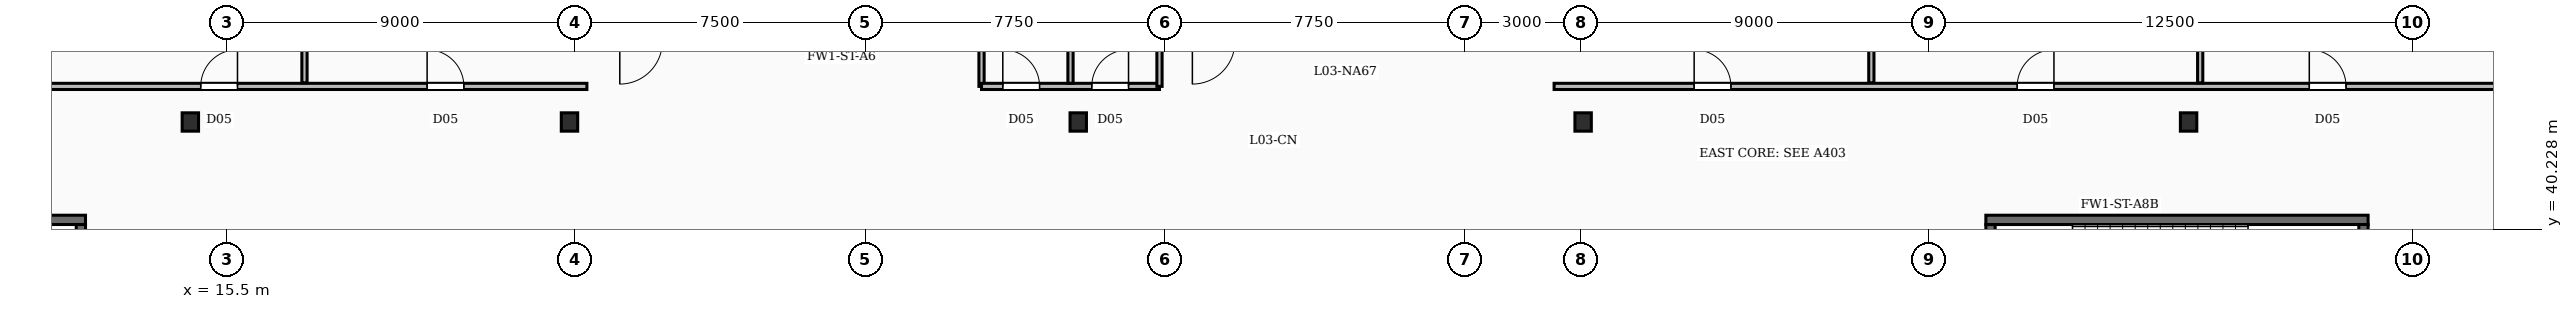
"""IFC4 building model, lengths in metres.
Left out: names, types, materials, properties, quantities, classifications, styles, units other than length and angle.
Written with IfcOpenShell. Run it as: python <this file> out.ifc"""

import sys

from ifc_helpers import new_model, si_unit, direction, frame, frame_2d, origin, origin_2d, place, context, subcontext, project, spatial, rectangle, i_section, extrude, element, fill, save


model = new_model("IFC4")
c1 = context("Model", 3, precision=1e-05, world=origin(), true_north=direction((0.0, 1.0)))
c2 = subcontext(c1, "Body", "Model", "MODEL_VIEW")
j1 = project(units=[si_unit("LENGTHUNIT", "METRE"), si_unit("PLANEANGLEUNIT", "RADIAN")], contexts=[c1])
p1 = place(None, origin())
s1 = spatial("IfcSite", under=j1, at=p1, CompositionType="ELEMENT")
p2 = place(p1, origin())
s2 = spatial("IfcBuilding", under=s1, at=p2, CompositionType="ELEMENT")
p3 = place(p2, frame((0.0, 0.0, 18.0)))
s3 = spatial("IfcBuildingStorey", under=s2, at=p3, CompositionType="ELEMENT", Elevation=18.0)
for number, where, z_axis, x_axis in (
    (1, (14.55, 43.0, -0.35), (0.0, 0.0, 1.0), (1.0, 0.0, 0.0)),
    (2, (24.35, 43.0, -0.35), (0.0, 0.0, 1.0), (1.0, 0.0, 0.0)),
    (3, (37.5, 43.0, -0.35), (0.0, 0.0, 1.0), (1.0, 0.0, 0.0)),
    (4, (50.55, 43.0, -0.35), (0.0, 0.0, 1.0), (1.0, 0.0, 0.0)),
    (5, (66.2, 43.0, -0.35), (0.0, 0.0, 1.0), (1.0, 0.0, 0.0)),
):
    element("IfcColumn", number, at=place(p3, frame(where, z_axis=z_axis, x_axis=x_axis)), inside=s3, PredefinedType="COLUMN", context=c2, shape_type="SweptSolid", body=[
        extrude(i_section(OverallWidth=0.424, OverallDepth=0.474, WebThickness=0.048, FlangeThickness=0.077, FilletRadius=0.02, at=origin_2d()), origin(), (0.0, 0.0, 1.0), 5.0),
    ])
p4 = place(p3, frame((1.96, 40.47, 0.0), z_axis=(0.0, 0.0, 1.0), x_axis=(1.0, 0.0, 0.0)))
e6 = element("IfcWall", 6, at=p4, inside=s3, PredefinedType="SOLIDWALL", context=c2, shape_type="SweptSolid", body=[
    extrude(rectangle(XDim=9.88, YDim=0.24, at=frame_2d((4.94, 0.0))), origin(), (0.0, 0.0, 1.0), 4.65),
])
p5 = place(p3, frame((11.72, 36.2, 0.0), z_axis=(0.0, 0.0, 1.0), x_axis=(0.0, 1.0, 0.0)))
e7 = element("IfcWall", 7, at=p5, inside=s3, PredefinedType="SOLIDWALL", context=c2, shape_type="SweptSolid", body=[
    extrude(rectangle(XDim=4.15, YDim=0.24, at=frame_2d((2.075, 0.0))), origin(), (0.0, 0.0, 1.0), 4.65),
])
p6 = place(p3, frame((60.96, 40.47, 0.0), z_axis=(0.0, 0.0, 1.0), x_axis=(1.0, 0.0, 0.0)))
e8 = element("IfcWall", 8, at=p6, inside=s3, PredefinedType="SOLIDWALL", context=c2, shape_type="SweptSolid", body=[
    extrude(rectangle(XDim=9.88, YDim=0.24, at=frame_2d((4.94, 0.0))), origin(), (0.0, 0.0, 1.0), 4.65),
])
for number, where, z_axis, x_axis in (
    (9, (61.08, 36.2, 0.0), (0.0, 0.0, 1.0), (0.0, 1.0, 0.0)),
    (10, (70.72, 36.2, 0.0), (0.0, 0.0, 1.0), (0.0, 1.0, 0.0)),
):
    element("IfcWall", number, at=place(p3, frame(where, z_axis=z_axis, x_axis=x_axis)), inside=s3, PredefinedType="SOLIDWALL", context=c2, shape_type="SweptSolid", body=[
        extrude(rectangle(XDim=4.15, YDim=0.24, at=frame_2d((2.075, 0.0))), origin(), (0.0, 0.0, 1.0), 4.65),
    ])
p7 = place(p3, frame((17.5, 44.01, 0.0), z_axis=(0.0, 0.0, 1.0), x_axis=(0.0, 1.0, 0.0)))
e11 = element("IfcWall", 11, at=p7, inside=s3, PredefinedType="PARTITIONING", context=c2, shape_type="SweptSolid", body=[
    extrude(rectangle(XDim=10.49, YDim=0.135, at=frame_2d((5.245, 0.0))), origin(), (0.0, 0.0, 1.0), 3.71),
])
p8 = place(p7, frame((2.2, 0.0, 0.0)))
e12 = element("IfcOpeningElement", 12, at=p8, cuts=e11, PredefinedType="OPENING", context=c2, shape_type="SweptSolid", body=[
    extrude(rectangle(XDim=0.95, YDim=2.15, at=frame_2d((0.475, 1.075))), frame((0.0, 0.077, 0.0), z_axis=(0.0, -1.0, 0.0), x_axis=(1.0, 0.0, 0.0)), (0.0, 0.0, 1.0), 0.155),
])
p9 = place(p3, frame((0.0, 43.92, 0.0), z_axis=(0.0, 0.0, 1.0), x_axis=(1.0, 0.0, 0.0)))
e13 = element("IfcWall", 13, at=p9, inside=s3, PredefinedType="PARTITIONING", context=c2, shape_type="SweptSolid", body=[
    extrude(rectangle(XDim=24.8, YDim=0.16, at=frame_2d((12.4, 0.0))), origin(), (0.0, 0.0, 1.0), 3.71),
])
p10 = place(p9, frame((14.818, 0.0, 0.0)))
e14 = element("IfcOpeningElement", 14, at=p10, cuts=e13, PredefinedType="OPENING", context=c2, shape_type="SweptSolid", body=[
    extrude(rectangle(XDim=0.95, YDim=2.15, at=frame_2d((0.475, 1.075))), frame((0.0, 0.09, 0.0), z_axis=(0.0, -1.0, 0.0), x_axis=(1.0, 0.0, 0.0)), (0.0, 0.0, 1.0), 0.18),
])
p11 = place(p9, frame((20.67, 0.0, 0.0)))
e15 = element("IfcOpeningElement", 15, at=p11, cuts=e13, PredefinedType="OPENING", context=c2, shape_type="SweptSolid", body=[
    extrude(rectangle(XDim=0.95, YDim=2.15, at=frame_2d((0.475, 1.075))), frame((0.0, 0.09, 0.0), z_axis=(0.0, -1.0, 0.0), x_axis=(1.0, 0.0, 0.0)), (0.0, 0.0, 1.0), 0.18),
])
p12 = place(p3, frame((58.0, 44.01, 0.0), z_axis=(0.0, 0.0, 1.0), x_axis=(0.0, 1.0, 0.0)))
e16 = element("IfcWall", 16, at=p12, inside=s3, PredefinedType="PARTITIONING", context=c2, shape_type="SweptSolid", body=[
    extrude(rectangle(XDim=10.49, YDim=0.135, at=frame_2d((5.245, 0.0))), origin(), (0.0, 0.0, 1.0), 3.71),
])
p13 = place(p12, frame((2.2, 0.0, 0.0)))
e17 = element("IfcOpeningElement", 17, at=p13, cuts=e16, PredefinedType="OPENING", context=c2, shape_type="SweptSolid", body=[
    extrude(rectangle(XDim=0.95, YDim=2.15, at=frame_2d((0.475, 1.075))), frame((0.0, 0.077, 0.0), z_axis=(0.0, -1.0, 0.0), x_axis=(1.0, 0.0, 0.0)), (0.0, 0.0, 1.0), 0.155),
])
p14 = place(p3, frame((66.5, 44.01, 0.0), z_axis=(0.0, 0.0, 1.0), x_axis=(0.0, 1.0, 0.0)))
e18 = element("IfcWall", 18, at=p14, inside=s3, PredefinedType="PARTITIONING", context=c2, shape_type="SweptSolid", body=[
    extrude(rectangle(XDim=10.49, YDim=0.135, at=frame_2d((5.245, 0.0))), origin(), (0.0, 0.0, 1.0), 3.71),
])
p15 = place(p14, frame((2.2, 0.0, 0.0)))
e19 = element("IfcOpeningElement", 19, at=p15, cuts=e18, PredefinedType="OPENING", context=c2, shape_type="SweptSolid", body=[
    extrude(rectangle(XDim=0.95, YDim=2.15, at=frame_2d((0.475, 1.075))), frame((0.0, 0.077, 0.0), z_axis=(0.0, -1.0, 0.0), x_axis=(1.0, 0.0, 0.0)), (0.0, 0.0, 1.0), 0.155),
])
p16 = place(p3, frame((49.8, 43.92, 0.0), z_axis=(0.0, 0.0, 1.0), x_axis=(1.0, 0.0, 0.0)))
e20 = element("IfcWall", 20, at=p16, inside=s3, PredefinedType="PARTITIONING", context=c2, shape_type="SweptSolid", body=[
    extrude(rectangle(XDim=29.7, YDim=0.16, at=frame_2d((14.85, 0.0))), origin(), (0.0, 0.0, 1.0), 3.71),
])
p17 = place(p16, frame((3.62, 0.0, 0.0)))
e21 = element("IfcOpeningElement", 21, at=p17, cuts=e20, PredefinedType="OPENING", context=c2, shape_type="SweptSolid", body=[
    extrude(rectangle(XDim=0.95, YDim=2.15, at=frame_2d((0.475, 1.075))), frame((0.0, 0.09, 0.0), z_axis=(0.0, -1.0, 0.0), x_axis=(1.0, 0.0, 0.0)), (0.0, 0.0, 1.0), 0.18),
])
p18 = place(p16, frame((11.97, 0.0, 0.0)))
e22 = element("IfcOpeningElement", 22, at=p18, cuts=e20, PredefinedType="OPENING", context=c2, shape_type="SweptSolid", body=[
    extrude(rectangle(XDim=0.95, YDim=2.15, at=frame_2d((0.475, 1.075))), frame((0.0, 0.09, 0.0), z_axis=(0.0, -1.0, 0.0), x_axis=(1.0, 0.0, 0.0)), (0.0, 0.0, 1.0), 0.18),
])
p19 = place(p16, frame((19.52, 0.0, 0.0)))
e23 = element("IfcOpeningElement", 23, at=p19, cuts=e20, PredefinedType="OPENING", context=c2, shape_type="SweptSolid", body=[
    extrude(rectangle(XDim=0.95, YDim=2.15, at=frame_2d((0.475, 1.075))), frame((0.0, 0.09, 0.0), z_axis=(0.0, -1.0, 0.0), x_axis=(1.0, 0.0, 0.0)), (0.0, 0.0, 1.0), 0.18),
])
p20 = place(p3, frame((35.0, 43.92, 0.0), z_axis=(0.0, 0.0, 1.0), x_axis=(1.0, 0.0, 0.0)))
e24 = element("IfcWall", 24, at=p20, inside=s3, PredefinedType="PARTITIONING", context=c2, shape_type="SweptSolid", body=[
    extrude(rectangle(XDim=4.6, YDim=0.16, at=frame_2d((2.3, 0.0))), origin(), (0.0, 0.0, 1.0), 3.71),
])
p21 = place(p20, frame((0.55, 0.0, 0.0)))
e25 = element("IfcOpeningElement", 25, at=p21, cuts=e24, PredefinedType="OPENING", context=c2, shape_type="SweptSolid", body=[
    extrude(rectangle(XDim=0.95, YDim=2.15, at=frame_2d((0.475, 1.075))), frame((0.0, 0.09, 0.0), z_axis=(0.0, -1.0, 0.0), x_axis=(1.0, 0.0, 0.0)), (0.0, 0.0, 1.0), 0.18),
])
p22 = place(p20, frame((2.85, 0.0, 0.0)))
e26 = element("IfcOpeningElement", 26, at=p22, cuts=e24, PredefinedType="OPENING", context=c2, shape_type="SweptSolid", body=[
    extrude(rectangle(XDim=0.95, YDim=2.15, at=frame_2d((0.475, 1.075))), frame((0.0, 0.09, 0.0), z_axis=(0.0, -1.0, 0.0), x_axis=(1.0, 0.0, 0.0)), (0.0, 0.0, 1.0), 0.18),
])
p23 = place(p3, frame((37.3, 44.0, 0.0), z_axis=(0.0, 0.0, 1.0), x_axis=(0.0, 1.0, 0.0)))
e27 = element("IfcWall", 27, at=p23, inside=s3, PredefinedType="PARTITIONING", context=c2, shape_type="SweptSolid", body=[
    extrude(rectangle(XDim=10.5, YDim=0.135, at=frame_2d((5.25, 0.0))), origin(), (0.0, 0.0, 1.0), 3.71),
])
for number, where, z_axis, x_axis in (
    (28, (35.0, 43.92, 0.0), (0.0, 0.0, 1.0), (0.0, 1.0, 0.0)),
    (29, (39.6, 43.92, 0.0), (0.0, 0.0, 1.0), (0.0, 1.0, 0.0)),
):
    element("IfcWall", number, at=place(p3, frame(where, z_axis=z_axis, x_axis=x_axis)), inside=s3, PredefinedType="PARTITIONING", context=c2, shape_type="SweptSolid", body=[
        extrude(rectangle(XDim=10.58, YDim=0.135, at=frame_2d((5.29, 0.0))), origin(), (0.0, 0.0, 1.0), 3.71),
    ])
p24 = place(p10, origin())
e30 = element("IfcDoor", 30, at=p24, inside=s3, OperationType="SINGLE_SWING_RIGHT", PredefinedType="DOOR", context=c2, shape_type="SweptSolid", body=[
    extrude(rectangle(XDim=0.95, YDim=2.15, at=frame_2d((0.475, 1.075))), frame((0.0, 0.025, 0.0), z_axis=(0.0, -1.0, 0.0), x_axis=(1.0, 0.0, 0.0)), (0.0, 0.0, 1.0), 0.05),
])
fill(e14, e30)
p25 = place(p11, origin())
e31 = element("IfcDoor", 31, at=p25, inside=s3, OperationType="SINGLE_SWING_LEFT", PredefinedType="DOOR", context=c2, shape_type="SweptSolid", body=[
    extrude(rectangle(XDim=0.95, YDim=2.15, at=frame_2d((0.475, 1.075))), frame((0.0, 0.025, 0.0), z_axis=(0.0, -1.0, 0.0), x_axis=(1.0, 0.0, 0.0)), (0.0, 0.0, 1.0), 0.05),
])
fill(e15, e31)
p26 = place(p17, origin())
e32 = element("IfcDoor", 32, at=p26, inside=s3, OperationType="SINGLE_SWING_LEFT", PredefinedType="DOOR", context=c2, shape_type="SweptSolid", body=[
    extrude(rectangle(XDim=0.95, YDim=2.15, at=frame_2d((0.475, 1.075))), frame((0.0, 0.025, 0.0), z_axis=(0.0, -1.0, 0.0), x_axis=(1.0, 0.0, 0.0)), (0.0, 0.0, 1.0), 0.05),
])
fill(e21, e32)
p27 = place(p18, origin())
e33 = element("IfcDoor", 33, at=p27, inside=s3, OperationType="SINGLE_SWING_RIGHT", PredefinedType="DOOR", context=c2, shape_type="SweptSolid", body=[
    extrude(rectangle(XDim=0.95, YDim=2.15, at=frame_2d((0.475, 1.075))), frame((0.0, 0.025, 0.0), z_axis=(0.0, -1.0, 0.0), x_axis=(1.0, 0.0, 0.0)), (0.0, 0.0, 1.0), 0.05),
])
fill(e22, e33)
p28 = place(p19, origin())
e34 = element("IfcDoor", 34, at=p28, inside=s3, OperationType="SINGLE_SWING_LEFT", PredefinedType="DOOR", context=c2, shape_type="SweptSolid", body=[
    extrude(rectangle(XDim=0.95, YDim=2.15, at=frame_2d((0.475, 1.075))), frame((0.0, 0.025, 0.0), z_axis=(0.0, -1.0, 0.0), x_axis=(1.0, 0.0, 0.0)), (0.0, 0.0, 1.0), 0.05),
])
fill(e23, e34)
p29 = place(p21, origin())
e35 = element("IfcDoor", 35, at=p29, inside=s3, OperationType="SINGLE_SWING_LEFT", PredefinedType="DOOR", context=c2, shape_type="SweptSolid", body=[
    extrude(rectangle(XDim=0.95, YDim=2.15, at=frame_2d((0.475, 1.075))), frame((0.0, 0.025, 0.0), z_axis=(0.0, -1.0, 0.0), x_axis=(1.0, 0.0, 0.0)), (0.0, 0.0, 1.0), 0.05),
])
fill(e25, e35)
p30 = place(p22, origin())
e36 = element("IfcDoor", 36, at=p30, inside=s3, OperationType="SINGLE_SWING_RIGHT", PredefinedType="DOOR", context=c2, shape_type="SweptSolid", body=[
    extrude(rectangle(XDim=0.95, YDim=2.15, at=frame_2d((0.475, 1.075))), frame((0.0, 0.025, 0.0), z_axis=(0.0, -1.0, 0.0), x_axis=(1.0, 0.0, 0.0)), (0.0, 0.0, 1.0), 0.05),
])
fill(e26, e36)
save(model, sys.argv[1])
